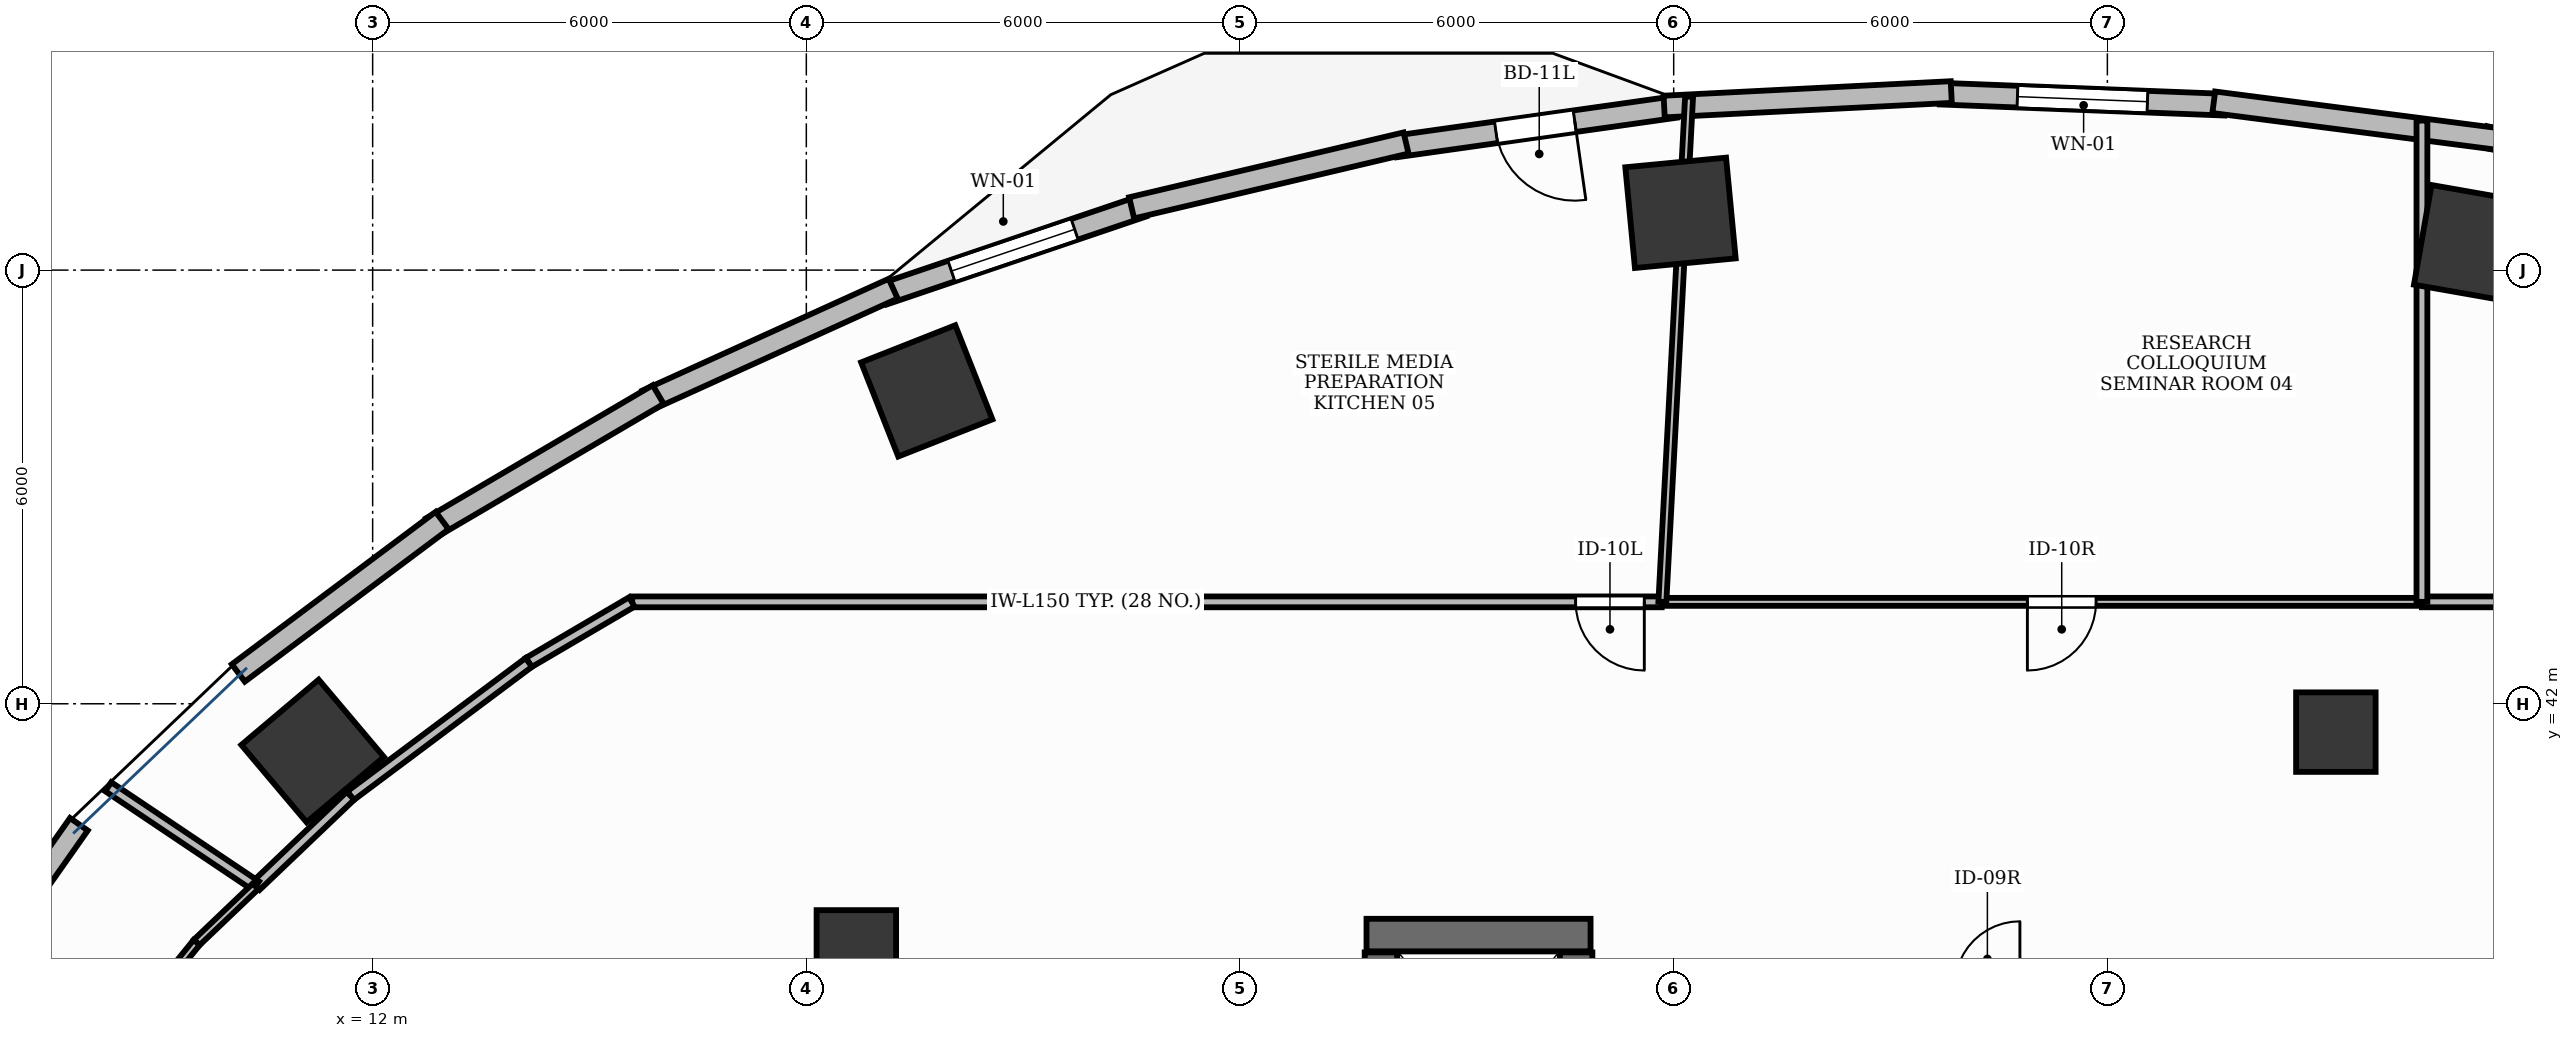
"""IFC4 building model, lengths in metres.
Left out: names, types, materials, properties, quantities, classifications, styles, units other than length and angle.
Written with IfcOpenShell. Run it as: python <this file> out.ifc"""

import sys

from ifc_helpers import new_model, si_unit, direction, frame, frame_2d, origin, origin_2d, place, context, subcontext, project, spatial, rectangle, extrude, element, fill, save


model = new_model("IFC4")
c1 = context("Model", 3, precision=1e-05, world=origin(), true_north=direction((0.0, 1.0)))
c2 = subcontext(c1, "Body", "Model", "MODEL_VIEW")
j1 = project(units=[si_unit("LENGTHUNIT", "METRE"), si_unit("PLANEANGLEUNIT", "RADIAN")], contexts=[c1])
p1 = place(None, origin())
s1 = spatial("IfcSite", under=j1, at=p1, CompositionType="ELEMENT")
p2 = place(p1, origin())
s2 = spatial("IfcBuilding", under=s1, at=p2, CompositionType="ELEMENT")
p3 = place(p2, frame((0.0, 0.0, 67.8)))
s3 = spatial("IfcBuildingStorey", under=s2, at=p3, CompositionType="ELEMENT", Elevation=67.8)
p4 = place(p3, frame((25.75, 38.8, 0.0), z_axis=(0.0, 0.0, 1.0), x_axis=(1.0, 0.0, 0.0)))
e1 = element("IfcWall", 1, at=p4, inside=s3, PredefinedType="SHEAR", context=c2, shape_type="SweptSolid", body=[
    extrude(rectangle(XDim=3.1, YDim=0.45, at=frame_2d((1.55, 0.0))), origin(), (0.0, 0.0, 1.0), 3.9),
])
for number, where, z_axis, x_axis in (
    (2, (25.95, 35.86, 0.0), (0.0, 0.0, 1.0), (0.0, 1.0, 0.0)),
    (3, (28.65, 35.86, 0.0), (0.0, 0.0, 1.0), (0.0, 1.0, 0.0)),
):
    element("IfcWall", number, at=place(p3, frame(where, z_axis=z_axis, x_axis=x_axis)), inside=s3, PredefinedType="SHEAR", context=c2, shape_type="SweptSolid", body=[
        extrude(rectangle(XDim=2.7, YDim=0.45, at=frame_2d((1.35, 0.0))), origin(), (0.0, 0.0, 1.0), 3.9),
    ])
p5 = place(p3, frame((41.052, 48.367, -0.0), z_axis=(0.0, 0.0, 1.0), x_axis=(-0.984868307662, 0.173304404339, 0.0)))
e4 = element("IfcColumn", 4, at=p5, inside=s3, PredefinedType="COLUMN", context=c2, shape_type="SweptSolid", body=[
    extrude(rectangle(XDim=1.4, YDim=1.4, at=origin_2d()), origin(), (0.0, 0.0, 1.0), 3.901),
])
p6 = place(p3, frame((39.161, 41.608, -0.0), z_axis=(0.0, 0.0, 1.0), x_axis=(1.0, 0.0, 0.0)))
e5 = element("IfcColumn", 5, at=p6, inside=s3, PredefinedType="COLUMN", context=c2, shape_type="SweptSolid", body=[
    extrude(rectangle(XDim=1.1, YDim=1.1, at=origin_2d()), origin(), (0.0, 0.0, 1.0), 3.901),
])
for number, where, z_axis, x_axis in (
    (6, (30.094, 48.792, -0.0), (0.0, 0.0, 1.0), (0.995, 0.095, 0.0)),
    (7, (19.667, 46.329, -0.0), (0.0, 0.0, 1.0), (0.93, 0.367, 0.0)),
    (8, (11.17, 41.347, -0.0), (0.0, 0.0, 1.0), (0.764, 0.645, 0.0)),
):
    element("IfcColumn", number, at=place(p3, frame(where, z_axis=z_axis, x_axis=x_axis)), inside=s3, PredefinedType="COLUMN", context=c2, shape_type="SweptSolid", body=[
        extrude(rectangle(XDim=1.4, YDim=1.4, at=origin_2d()), origin(), (0.0, 0.0, 1.0), 3.901),
    ])
p7 = place(p3, frame((18.692, 38.595, -0.0), z_axis=(0.0, 0.0, 1.0), x_axis=(1.0, 0.0, 0.0)))
e9 = element("IfcColumn", 9, at=p7, inside=s3, PredefinedType="COLUMN", context=c2, shape_type="SweptSolid", body=[
    extrude(rectangle(XDim=1.1, YDim=1.1, at=origin_2d()), origin(), (0.0, 0.0, 1.0), 3.901),
])
p8 = place(p3, frame((37.623, 50.289, 0.0), z_axis=(0.0, 0.0, 1.0), x_axis=(-0.999247008469, 0.038799691558, 0.0)))
e10 = element("IfcWall", 10, at=p8, inside=s3, PredefinedType="STANDARD", context=c2, shape_type="SweptSolid", body=[
    extrude(rectangle(XDim=3.939, YDim=0.3, at=frame_2d((1.969, 0.0))), origin(), (0.0, 0.0, 1.0), 3.9),
])
p9 = place(p8, frame((1.069, 0.0, 0.9)))
e11 = element("IfcOpeningElement", 11, at=p9, cuts=e10, PredefinedType="OPENING", context=c2, shape_type="SweptSolid", body=[
    extrude(rectangle(XDim=1.8, YDim=2.1, at=frame_2d((0.9, 1.05))), frame((0.0, 0.165, 0.0), z_axis=(0.0, -1.0, 0.0), x_axis=(1.0, 0.0, 0.0)), (0.0, 0.0, 1.0), 0.33),
])
p10 = place(p3, frame((30.023, 50.257, 0.0), z_axis=(0.0, 0.0, 1.0), x_axis=(-0.990165573956, -0.139900450869, 0.0)))
e12 = element("IfcWall", 12, at=p10, inside=s3, PredefinedType="STANDARD", context=c2, shape_type="SweptSolid", body=[
    extrude(rectangle(XDim=3.911, YDim=0.3, at=frame_2d((1.956, 0.0))), origin(), (0.0, 0.0, 1.0), 3.9),
])
p11 = place(p10, frame((1.406, 0.0, 0.0)))
e13 = element("IfcOpeningElement", 13, at=p11, cuts=e12, PredefinedType="OPENING", context=c2, shape_type="SweptSolid", body=[
    extrude(rectangle(XDim=1.1, YDim=2.15, at=frame_2d((0.55, 1.075))), frame((0.0, 0.165, 0.0), z_axis=(0.0, -1.0, 0.0), x_axis=(1.0, 0.0, 0.0)), (0.0, 0.0, 1.0), 0.33),
])
p12 = place(p3, frame((22.655, 48.884, 0.0), z_axis=(0.0, 0.0, 1.0), x_axis=(-0.947034337234, -0.321132315564, 0.0)))
e14 = element("IfcWall", 14, at=p12, inside=s3, PredefinedType="STANDARD", context=c2, shape_type="SweptSolid", body=[
    extrude(rectangle(XDim=3.79, YDim=0.3, at=frame_2d((1.895, 0.0))), origin(), (0.0, 0.0, 1.0), 3.9),
])
p13 = place(p12, frame((0.995, 0.0, 0.9)))
e15 = element("IfcOpeningElement", 15, at=p13, cuts=e14, PredefinedType="OPENING", context=c2, shape_type="SweptSolid", body=[
    extrude(rectangle(XDim=1.8, YDim=2.1, at=frame_2d((0.9, 1.05))), frame((0.0, 0.165, 0.0), z_axis=(0.0, -1.0, 0.0), x_axis=(1.0, 0.0, 0.0)), (0.0, 0.0, 1.0), 0.33),
])
p14 = place(p3, frame((45.04, 48.991, 0.0), z_axis=(0.0, 0.0, 1.0), x_axis=(-0.975868573345, 0.218358713032, 0.0)))
e16 = element("IfcWall", 16, at=p14, inside=s3, PredefinedType="STANDARD", context=c2, shape_type="SweptSolid", body=[
    extrude(rectangle(XDim=3.909, YDim=0.3, at=frame_2d((1.954, 0.0))), origin(), (0.0, 0.0, 1.0), 3.9),
])
p15 = place(p3, frame((41.395, 49.815, 0.0), z_axis=(0.0, 0.0, 1.0), x_axis=(-0.991734095036, 0.128310111617, 0.0)))
e17 = element("IfcWall", 17, at=p15, inside=s3, PredefinedType="STANDARD", context=c2, shape_type="SweptSolid", body=[
    extrude(rectangle(XDim=3.956, YDim=0.3, at=frame_2d((1.978, 0.0))), origin(), (0.0, 0.0, 1.0), 3.9),
])
p16 = place(p3, frame((33.84, 50.463, 0.0), z_axis=(0.0, 0.0, 1.0), x_axis=(-0.998732359232, -0.050335619826, 0.0)))
e18 = element("IfcWall", 18, at=p16, inside=s3, PredefinedType="STANDARD", context=c2, shape_type="SweptSolid", body=[
    extrude(rectangle(XDim=3.977, YDim=0.3, at=frame_2d((1.989, 0.0))), origin(), (0.0, 0.0, 1.0), 3.9),
])
p17 = place(p3, frame((26.297, 49.759, 0.0), z_axis=(0.0, 0.0, 1.0), x_axis=(-0.973197600754, -0.229970497863, 0.0)))
e19 = element("IfcWall", 19, at=p17, inside=s3, PredefinedType="STANDARD", context=c2, shape_type="SweptSolid", body=[
    extrude(rectangle(XDim=3.901, YDim=0.3, at=frame_2d((1.951, 0.0))), origin(), (0.0, 0.0, 1.0), 3.9),
])
p18 = place(p3, frame((19.201, 47.743, 0.0), z_axis=(0.0, 0.0, 1.0), x_axis=(-0.910623406862, -0.413237233166, 0.0)))
e20 = element("IfcWall", 20, at=p18, inside=s3, PredefinedType="STANDARD", context=c2, shape_type="SweptSolid", body=[
    extrude(rectangle(XDim=3.74, YDim=0.3, at=frame_2d((1.87, 0.0))), origin(), (0.0, 0.0, 1.0), 3.47),
])
p19 = place(p3, frame((15.951, 46.278, 0.0), z_axis=(0.0, 0.0, 1.0), x_axis=(-0.8624654944, -0.506115867139, 0.0)))
e21 = element("IfcWall", 21, at=p19, inside=s3, PredefinedType="STANDARD", context=c2, shape_type="SweptSolid", body=[
    extrude(rectangle(XDim=3.635, YDim=0.3, at=frame_2d((1.818, 0.0))), origin(), (0.0, 0.0, 1.0), 3.9),
])
p20 = place(p3, frame((12.961, 44.535, 0.0), z_axis=(0.0, 0.0, 1.0), x_axis=(-0.800823020995, -0.598901067827, 0.0)))
e22 = element("IfcWall", 22, at=p20, inside=s3, PredefinedType="STANDARD", context=c2, shape_type="SweptSolid", body=[
    extrude(rectangle(XDim=3.521, YDim=0.3, at=frame_2d((1.76, 0.0))), origin(), (0.0, 0.0, 1.0), 3.47),
])
p21 = place(p3, frame((7.936, 40.333, 0.0), z_axis=(0.0, 0.0, 1.0), x_axis=(-0.575165804445, -0.818036855769, 0.0)))
e23 = element("IfcWall", 23, at=p21, inside=s3, PredefinedType="STANDARD", context=c2, shape_type="SweptSolid", body=[
    extrude(rectangle(XDim=6.296, YDim=0.3, at=frame_2d((3.148, 0.0))), origin(), (0.0, 0.0, 1.0), 3.9),
])
p22 = place(p3, frame((40.342, 43.41, 0.0), z_axis=(0.0, 0.0, 1.0), x_axis=(-1.0, 0.0, 0.0)))
e24 = element("IfcWall", 24, at=p22, inside=s3, PredefinedType="MOVABLE", context=c2, shape_type="SweptSolid", body=[
    extrude(rectangle(XDim=10.499, YDim=0.11, at=frame_2d((5.249, 0.0))), origin(), (0.0, 0.0, 1.0), 2.91),
])
p23 = place(p22, frame((4.499, 0.0, 0.0)))
e25 = element("IfcOpeningElement", 25, at=p23, cuts=e24, PredefinedType="OPENING", context=c2, shape_type="SweptSolid", body=[
    extrude(rectangle(XDim=0.95, YDim=2.15, at=frame_2d((0.475, 1.075))), frame((0.0, 0.07, 0.0), z_axis=(0.0, -1.0, 0.0), x_axis=(1.0, 0.0, 0.0)), (0.0, 0.0, 1.0), 0.14),
])
p24 = place(p3, frame((29.833, 43.41, 0.0), z_axis=(0.0, 0.0, 1.0), x_axis=(-1.0, 0.0, 0.0)))
e26 = element("IfcWall", 26, at=p24, inside=s3, PredefinedType="PARTITIONING", context=c2, shape_type="SweptSolid", body=[
    extrude(rectangle(XDim=14.243, YDim=0.15, at=frame_2d((7.121, 0.0))), origin(), (0.0, 0.0, 1.0), 2.91),
])
p25 = place(p24, frame((0.24, 0.0, 0.0)))
e27 = element("IfcOpeningElement", 27, at=p25, cuts=e26, PredefinedType="OPENING", context=c2, shape_type="SweptSolid", body=[
    extrude(rectangle(XDim=0.95, YDim=2.15, at=frame_2d((0.475, 1.075))), frame((0.0, 0.09, 0.0), z_axis=(0.0, -1.0, 0.0), x_axis=(1.0, 0.0, 0.0)), (0.0, 0.0, 1.0), 0.18),
])
p26 = place(p3, frame((44.2, 43.41, 0.0), z_axis=(0.0, 0.0, 1.0), x_axis=(-1.0, 0.0, 0.0)))
e28 = element("IfcWall", 28, at=p26, inside=s3, PredefinedType="PARTITIONING", context=c2, shape_type="SweptSolid", body=[
    extrude(rectangle(XDim=3.848, YDim=0.15, at=frame_2d((1.924, 0.0))), origin(), (0.0, 0.0, 1.0), 2.91),
])
p27 = place(p3, frame((40.352, 43.41, 0.0), z_axis=(0.0, 0.0, 1.0), x_axis=(0.0, 1.0, 0.0)))
e29 = element("IfcWall", 29, at=p27, inside=s3, PredefinedType="PARTITIONING", context=c2, shape_type="SweptSolid", body=[
    extrude(rectangle(XDim=6.659, YDim=0.15, at=frame_2d((3.329, 0.0))), origin(), (0.0, 0.0, 1.0), 2.91),
])
p28 = place(p3, frame((29.844, 43.41, 0.0), z_axis=(0.0, 0.0, 1.0), x_axis=(0.052809646161, 0.998604597061, 0.0)))
e30 = element("IfcWall", 30, at=p28, inside=s3, PredefinedType="MOVABLE", context=c2, shape_type="SweptSolid", body=[
    extrude(rectangle(XDim=6.999, YDim=0.11, at=frame_2d((3.5, 0.0))), origin(), (0.0, 0.0, 1.0), 2.91),
])
p29 = place(p3, frame((15.586, 43.409, 0.0), z_axis=(0.0, 0.0, 1.0), x_axis=(-0.862446636904, -0.506148000582, 0.0)))
e31 = element("IfcWall", 31, at=p29, inside=s3, PredefinedType="PARTITIONING", context=c2, shape_type="SweptSolid", body=[
    extrude(rectangle(XDim=1.652, YDim=0.15, at=frame_2d((0.826, 0.0))), origin(), (0.0, 0.0, 1.0), 2.91),
])
p30 = place(p3, frame((14.16, 42.572, 0.0), z_axis=(0.0, 0.0, 1.0), x_axis=(-0.800808090092, -0.598921032227, 0.0)))
e32 = element("IfcWall", 32, at=p30, inside=s3, PredefinedType="PARTITIONING", context=c2, shape_type="SweptSolid", body=[
    extrude(rectangle(XDim=3.079, YDim=0.15, at=frame_2d((1.54, 0.0))), origin(), (0.0, 0.0, 1.0), 2.91),
])
p31 = place(p3, frame((11.693, 40.727, 0.0), z_axis=(0.0, 0.0, 1.0), x_axis=(-0.723662214514, -0.690154330048, 0.0)))
e33 = element("IfcWall", 33, at=p31, inside=s3, PredefinedType="PARTITIONING", context=c2, shape_type="SweptSolid", body=[
    extrude(rectangle(XDim=1.807, YDim=0.15, at=frame_2d((0.903, 0.0))), origin(), (0.0, 0.0, 1.0), 2.91),
])
p32 = place(p3, frame((10.386, 39.48, 0.0), z_axis=(0.0, 0.0, 1.0), x_axis=(-0.830276202789, 0.557352157152, 0.0)))
e34 = element("IfcWall", 34, at=p32, inside=s3, PredefinedType="PARTITIONING", context=c2, shape_type="SweptSolid", body=[
    extrude(rectangle(XDim=2.462, YDim=0.15, at=frame_2d((1.231, 0.0))), origin(), (0.0, 0.0, 1.0), 2.91),
])
p33 = place(p3, frame((10.378, 39.473, 0.0), z_axis=(0.0, 0.0, 1.0), x_axis=(-0.723760277906, -0.690051490924, 0.0)))
e35 = element("IfcWall", 35, at=p33, inside=s3, PredefinedType="MOVABLE", context=c2, shape_type="SweptSolid", body=[
    extrude(rectangle(XDim=1.123, YDim=0.11, at=frame_2d((0.561, 0.0))), origin(), (0.0, 0.0, 1.0), 2.91),
])
p34 = place(p3, frame((9.565, 38.697, 0.0), z_axis=(0.0, 0.0, 1.0), x_axis=(-0.629270515505, -0.777186347227, 0.0)))
e36 = element("IfcWall", 36, at=p34, inside=s3, PredefinedType="MOVABLE", context=c2, shape_type="SweptSolid", body=[
    extrude(rectangle(XDim=2.817, YDim=0.11, at=frame_2d((1.409, 0.0))), origin(), (0.0, 0.0, 1.0), 2.91),
])
p35 = place(p9, origin())
e37 = element("IfcWindow", 37, at=p35, inside=s3, PartitioningType="SINGLE_PANEL", PredefinedType="WINDOW", context=c2, shape_type="SweptSolid", body=[
    extrude(rectangle(XDim=1.8, YDim=2.1, at=frame_2d((0.9, 1.05))), frame((0.0, 0.03, 0.0), z_axis=(0.0, -1.0, 0.0), x_axis=(1.0, 0.0, 0.0)), (0.0, 0.0, 1.0), 0.06),
])
fill(e11, e37)
p36 = place(p11, origin())
e38 = element("IfcDoor", 38, at=p36, inside=s3, OperationType="SINGLE_SWING_LEFT", PredefinedType="DOOR", context=c2, shape_type="SweptSolid", body=[
    extrude(rectangle(XDim=1.1, YDim=2.15, at=frame_2d((0.55, 1.075))), frame((0.0, 0.025, 0.0), z_axis=(0.0, -1.0, 0.0), x_axis=(1.0, 0.0, 0.0)), (0.0, 0.0, 1.0), 0.05),
])
fill(e13, e38)
p37 = place(p13, origin())
e39 = element("IfcWindow", 39, at=p37, inside=s3, PartitioningType="SINGLE_PANEL", PredefinedType="WINDOW", context=c2, shape_type="SweptSolid", body=[
    extrude(rectangle(XDim=1.8, YDim=2.1, at=frame_2d((0.9, 1.05))), frame((0.0, 0.03, 0.0), z_axis=(0.0, -1.0, 0.0), x_axis=(1.0, 0.0, 0.0)), (0.0, 0.0, 1.0), 0.06),
])
fill(e15, e39)
p38 = place(p23, origin())
e40 = element("IfcDoor", 40, at=p38, inside=s3, OperationType="SINGLE_SWING_RIGHT", PredefinedType="DOOR", context=c2, shape_type="SweptSolid", body=[
    extrude(rectangle(XDim=0.95, YDim=2.15, at=frame_2d((0.475, 1.075))), frame((0.0, 0.025, 0.0), z_axis=(0.0, -1.0, 0.0), x_axis=(1.0, 0.0, 0.0)), (0.0, 0.0, 1.0), 0.05),
])
fill(e25, e40)
p39 = place(p25, origin())
e41 = element("IfcDoor", 41, at=p39, inside=s3, OperationType="SINGLE_SWING_LEFT", PredefinedType="DOOR", context=c2, shape_type="SweptSolid", body=[
    extrude(rectangle(XDim=0.95, YDim=2.15, at=frame_2d((0.475, 1.075))), frame((0.0, 0.025, 0.0), z_axis=(0.0, -1.0, 0.0), x_axis=(1.0, 0.0, 0.0)), (0.0, 0.0, 1.0), 0.05),
])
fill(e27, e41)
save(model, sys.argv[1])
